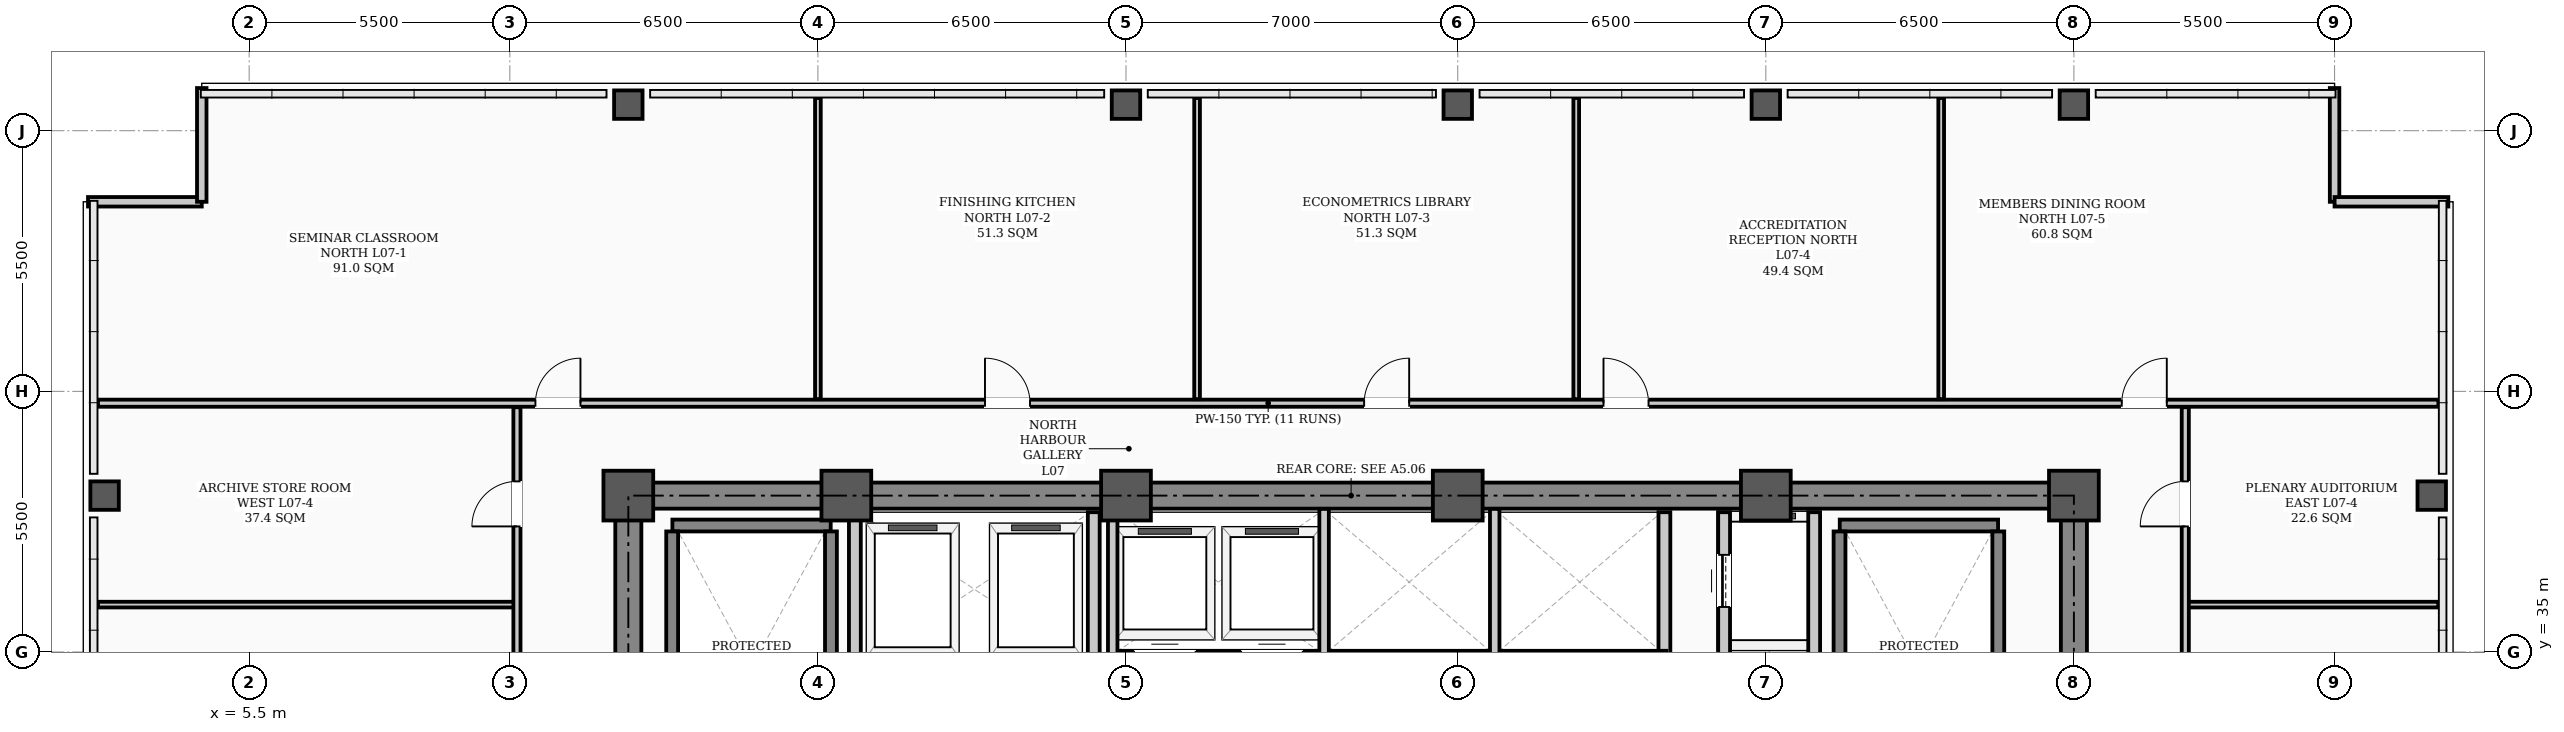
"""IFC4 building model, lengths in metres.
Left out: names, types, materials, properties, quantities, classifications, styles, units other than length and angle.
Written with IfcOpenShell. Run it as: python <this file> out.ifc"""

import sys

from ifc_helpers import new_model, si_unit, direction, frame, frame_2d, origin, origin_2d, place, context, subcontext, project, spatial, rectangle, hollow_rectangle, extrude, element, fill, save


model = new_model("IFC4")
c1 = context("Model", 3, precision=1e-05, world=origin(), true_north=direction((0.0, 1.0)))
c2 = subcontext(c1, "Body", "Model", "MODEL_VIEW")
j1 = project(units=[si_unit("LENGTHUNIT", "METRE"), si_unit("PLANEANGLEUNIT", "RADIAN")], contexts=[c1])
p1 = place(None, origin())
s1 = spatial("IfcSite", under=j1, at=p1, CompositionType="ELEMENT")
p2 = place(p1, origin())
s2 = spatial("IfcBuilding", under=s1, at=p2, CompositionType="ELEMENT")
p3 = place(p2, frame((0.0, 0.0, 30.4)))
s3 = spatial("IfcBuildingStorey", under=s2, at=p3, CompositionType="ELEMENT", Elevation=30.4)
for number, where, z_axis, x_axis in (
    (1, (13.5, 38.3, 0.0), (0.0, 0.0, 1.0), (1.0, 0.0, 0.0)),
    (2, (18.1, 38.3, 0.0), (0.0, 0.0, 1.0), (1.0, 0.0, 0.0)),
    (3, (24.0, 38.3, 0.0), (0.0, 0.0, 1.0), (1.0, 0.0, 0.0)),
    (4, (31.0, 38.3, 0.0), (0.0, 0.0, 1.0), (1.0, 0.0, 0.0)),
    (5, (37.5, 38.3, 0.0), (0.0, 0.0, 1.0), (1.0, 0.0, 0.0)),
    (6, (44.0, 38.3, 0.0), (0.0, 0.0, 1.0), (1.0, 0.0, 0.0)),
):
    element("IfcColumn", number, at=place(p3, frame(where, z_axis=z_axis, x_axis=x_axis)), inside=s3, PredefinedType="COLUMN", context=c2, shape_type="SweptSolid", body=[
        extrude(hollow_rectangle(XDim=1.05, YDim=1.05, WallThickness=0.038, InnerFilletRadius=0.019, OuterFilletRadius=0.057, at=origin_2d()), origin(), (0.0, 0.0, 1.0), 3.9),
    ])
for number, where, z_axis, x_axis in (
    (7, (2.45, 38.3, 0.0), (0.0, 0.0, 1.0), (1.0, 0.0, 0.0)),
    (8, (13.5, 46.55, 0.0), (0.0, 0.0, 1.0), (1.0, 0.0, 0.0)),
    (9, (24.0, 46.55, 0.0), (0.0, 0.0, 1.0), (1.0, 0.0, 0.0)),
    (10, (31.0, 46.55, 0.0), (0.0, 0.0, 1.0), (1.0, 0.0, 0.0)),
    (11, (37.5, 46.55, 0.0), (0.0, 0.0, 1.0), (1.0, 0.0, 0.0)),
    (12, (44.0, 46.55, 0.0), (0.0, 0.0, 1.0), (1.0, 0.0, 0.0)),
    (13, (51.55, 38.3, 0.0), (0.0, 0.0, 1.0), (1.0, 0.0, 0.0)),
):
    element("IfcColumn", number, at=place(p3, frame(where, z_axis=z_axis, x_axis=x_axis)), inside=s3, PredefinedType="COLUMN", context=c2, shape_type="SweptSolid", body=[
        extrude(hollow_rectangle(XDim=0.6, YDim=0.6, WallThickness=0.026, InnerFilletRadius=0.013, OuterFilletRadius=0.039, at=origin_2d()), origin(), (0.0, 0.0, 1.0), 3.9),
    ])
for number, where, z_axis, x_axis in (
    (14, (2.1, 44.5, 0.0), (0.0, 0.0, 1.0), (1.0, 0.0, 0.0)),
    (15, (4.5, 44.5, 0.0), (0.0, 0.0, 1.0), (0.0, 1.0, 0.0)),
    (16, (49.5, 46.9, 0.0), (0.0, 0.0, 1.0), (0.0, -1.0, 0.0)),
    (17, (49.5, 44.5, 0.0), (0.0, 0.0, 1.0), (1.0, 0.0, 0.0)),
):
    element("IfcWall", number, at=place(p3, frame(where, z_axis=z_axis, x_axis=x_axis)), inside=s3, PredefinedType="PARAPET", context=c2, shape_type="SweptSolid", body=[
        extrude(rectangle(XDim=2.4, YDim=0.2, at=frame_2d((1.2, 0.0))), origin(), (0.0, 0.0, 1.0), 1.2),
    ])
p4 = place(p3, frame((13.5, 38.3, 0.0), z_axis=(0.0, 0.0, 1.0), x_axis=(1.0, 0.0, 0.0)))
e18 = element("IfcWall", 18, at=p4, inside=s3, PredefinedType="SHEAR", context=c2, shape_type="SweptSolid", body=[
    extrude(rectangle(XDim=30.5, YDim=0.55, at=frame_2d((15.25, 0.0))), origin(), (0.0, 0.0, 1.0), 3.72),
])
for number, where, z_axis, x_axis in (
    (19, (13.5, 29.35, 0.0), (0.0, 0.0, 1.0), (0.0, 1.0, 0.0)),
    (20, (44.0, 29.35, 0.0), (0.0, 0.0, 1.0), (0.0, 1.0, 0.0)),
):
    element("IfcWall", number, at=place(p3, frame(where, z_axis=z_axis, x_axis=x_axis)), inside=s3, PredefinedType="SHEAR", context=c2, shape_type="SweptSolid", body=[
        extrude(rectangle(XDim=8.6, YDim=0.55, at=frame_2d((4.3, 0.0))), origin(), (0.0, 0.0, 1.0), 3.72),
    ])
p5 = place(p3, frame((14.43, 37.669, 0.0), z_axis=(0.0, 0.0, 1.0), x_axis=(1.0, 0.0, 0.0)))
e21 = element("IfcWall", 21, at=p5, inside=s3, PredefinedType="STANDARD", context=c2, shape_type="SweptSolid", body=[
    extrude(rectangle(XDim=3.34, YDim=0.25, at=frame_2d((1.67, 0.0))), origin(), (0.0, 0.0, 1.0), 3.72),
])
for number, where, z_axis, x_axis in (
    (22, (14.425, 30.36, 0.0), (0.0, 0.0, 1.0), (0.0, 1.0, 0.0)),
    (23, (17.775, 30.36, 0.0), (0.0, 0.0, 1.0), (0.0, 1.0, 0.0)),
):
    element("IfcWall", number, at=place(p3, frame(where, z_axis=z_axis, x_axis=x_axis)), inside=s3, PredefinedType="STANDARD", context=c2, shape_type="SweptSolid", body=[
        extrude(rectangle(XDim=7.184, YDim=0.25, at=frame_2d((3.592, 0.0))), origin(), (0.0, 0.0, 1.0), 3.72),
    ])
p6 = place(p3, frame((39.06, 37.669, 0.0), z_axis=(0.0, 0.0, 1.0), x_axis=(1.0, 0.0, 0.0)))
e24 = element("IfcWall", 24, at=p6, inside=s3, PredefinedType="STANDARD", context=c2, shape_type="SweptSolid", body=[
    extrude(rectangle(XDim=3.34, YDim=0.25, at=frame_2d((1.67, 0.0))), origin(), (0.0, 0.0, 1.0), 3.72),
])
for number, where, z_axis, x_axis in (
    (25, (39.055, 30.36, 0.0), (0.0, 0.0, 1.0), (0.0, 1.0, 0.0)),
    (26, (42.405, 30.36, 0.0), (0.0, 0.0, 1.0), (0.0, 1.0, 0.0)),
):
    element("IfcWall", number, at=place(p3, frame(where, z_axis=z_axis, x_axis=x_axis)), inside=s3, PredefinedType="STANDARD", context=c2, shape_type="SweptSolid", body=[
        extrude(rectangle(XDim=7.184, YDim=0.25, at=frame_2d((3.592, 0.0))), origin(), (0.0, 0.0, 1.0), 3.72),
    ])
p7 = place(p3, frame((36.62, 31.95, 0.0), z_axis=(0.0, 0.0, 1.0), x_axis=(0.0, 1.0, 0.0)))
e27 = element("IfcWall", 27, at=p7, inside=s3, PredefinedType="STANDARD", context=c2, shape_type="SweptSolid", body=[
    extrude(rectangle(XDim=6.0, YDim=0.25, at=frame_2d((3.0, 0.0))), origin(), (0.0, 0.0, 1.0), 3.3),
])
p8 = place(p7, frame((0.9, 0.0, 0.0)))
e28 = element("IfcOpeningElement", 28, at=p8, cuts=e27, PredefinedType="OPENING", context=c2, shape_type="SweptSolid", body=[
    extrude(rectangle(XDim=1.1, YDim=2.08, at=frame_2d((0.55, 1.04))), frame((0.0, 0.135, 0.0), z_axis=(0.0, -1.0, 0.0), x_axis=(1.0, 0.0, 0.0)), (0.0, 0.0, 1.0), 0.27),
])
p9 = place(p7, frame((4.0, 0.0, 0.0)))
e29 = element("IfcOpeningElement", 29, at=p9, cuts=e27, PredefinedType="OPENING", context=c2, shape_type="SweptSolid", body=[
    extrude(rectangle(XDim=1.1, YDim=2.08, at=frame_2d((0.55, 1.04))), frame((0.0, 0.135, 0.0), z_axis=(0.0, -1.0, 0.0), x_axis=(1.0, 0.0, 0.0)), (0.0, 0.0, 1.0), 0.27),
])
p10 = place(p3, frame((38.52, 31.95, 0.0), z_axis=(0.0, 0.0, 1.0), x_axis=(0.0, 1.0, 0.0)))
e30 = element("IfcWall", 30, at=p10, inside=s3, PredefinedType="STANDARD", context=c2, shape_type="SweptSolid", body=[
    extrude(rectangle(XDim=6.0, YDim=0.25, at=frame_2d((3.0, 0.0))), origin(), (0.0, 0.0, 1.0), 3.3),
])
for number, where, z_axis, x_axis in (
    (31, (18.28, 34.62, 0.0), (0.0, 0.0, 1.0), (0.0, 1.0, 0.0)),
    (32, (23.32, 34.62, 0.0), (0.0, 0.0, 1.0), (0.0, 1.0, 0.0)),
):
    element("IfcWall", number, at=place(p3, frame(where, z_axis=z_axis, x_axis=x_axis)), inside=s3, PredefinedType="STANDARD", context=c2, shape_type="SweptSolid", body=[
        extrude(rectangle(XDim=3.33, YDim=0.25, at=frame_2d((1.665, 0.0))), origin(), (0.0, 0.0, 1.0), 3.3),
    ])
p11 = place(p3, frame((35.36, 34.9, 0.0), z_axis=(0.0, 0.0, 1.0), x_axis=(0.0, 1.0, 0.0)))
e33 = element("IfcWall", 33, at=p11, inside=s3, PredefinedType="STANDARD", context=c2, shape_type="SweptSolid", body=[
    extrude(rectangle(XDim=3.05, YDim=0.25, at=frame_2d((1.525, 0.0))), origin(), (0.0, 0.0, 1.0), 3.3),
])
p12 = place(p3, frame((23.75, 34.9, 0.0), z_axis=(0.0, 0.0, 1.0), x_axis=(1.0, 0.0, 0.0)))
e34 = element("IfcWall", 34, at=p12, inside=s3, PredefinedType="STANDARD", context=c2, shape_type="SweptSolid", body=[
    extrude(rectangle(XDim=4.4, YDim=0.25, at=frame_2d((2.2, 0.0))), origin(), (0.0, 0.0, 1.0), 3.72),
])
p13 = place(p12, frame((0.42, 0.0, 0.0)))
e35 = element("IfcOpeningElement", 35, at=p13, cuts=e34, PredefinedType="OPENING", context=c2, shape_type="SweptSolid", body=[
    extrude(rectangle(XDim=1.3, YDim=2.08, at=frame_2d((0.65, 1.04))), frame((0.0, 0.135, 0.0), z_axis=(0.0, -1.0, 0.0), x_axis=(1.0, 0.0, 0.0)), (0.0, 0.0, 1.0), 0.27),
])
p14 = place(p12, frame((2.68, 0.0, 0.0)))
e36 = element("IfcOpeningElement", 36, at=p14, cuts=e34, PredefinedType="OPENING", context=c2, shape_type="SweptSolid", body=[
    extrude(rectangle(XDim=1.3, YDim=2.08, at=frame_2d((0.65, 1.04))), frame((0.0, 0.135, 0.0), z_axis=(0.0, -1.0, 0.0), x_axis=(1.0, 0.0, 0.0)), (0.0, 0.0, 1.0), 0.27),
])
p15 = place(p3, frame((28.2, 34.9, 0.0), z_axis=(0.0, 0.0, 1.0), x_axis=(1.0, 0.0, 0.0)))
e37 = element("IfcWall", 37, at=p15, inside=s3, PredefinedType="STANDARD", context=c2, shape_type="SweptSolid", body=[
    extrude(rectangle(XDim=3.55, YDim=0.25, at=frame_2d((1.775, 0.0))), origin(), (0.0, 0.0, 1.0), 3.72),
])
p16 = place(p3, frame((31.8, 34.9, 0.0), z_axis=(0.0, 0.0, 1.0), x_axis=(1.0, 0.0, 0.0)))
e38 = element("IfcWall", 38, at=p16, inside=s3, PredefinedType="STANDARD", context=c2, shape_type="SweptSolid", body=[
    extrude(rectangle(XDim=3.6, YDim=0.25, at=frame_2d((1.8, 0.0))), origin(), (0.0, 0.0, 1.0), 3.72),
])
p17 = place(p3, frame((2.31, 36.0, 0.0), z_axis=(0.0, 0.0, 1.0), x_axis=(1.0, 0.0, 0.0)))
e39 = element("IfcWall", 39, at=p17, inside=s3, PredefinedType="PARTITIONING", context=c2, shape_type="SweptSolid", body=[
    extrude(rectangle(XDim=8.84, YDim=0.12, at=frame_2d((4.42, 0.0))), origin(), (0.0, 0.0, 1.0), 3.212),
])
p18 = place(p3, frame((46.35, 36.0, 0.0), z_axis=(0.0, 0.0, 1.0), x_axis=(1.0, 0.0, 0.0)))
e40 = element("IfcWall", 40, at=p18, inside=s3, PredefinedType="PARTITIONING", context=c2, shape_type="SweptSolid", body=[
    extrude(rectangle(XDim=5.34, YDim=0.12, at=frame_2d((2.67, 0.0))), origin(), (0.0, 0.0, 1.0), 3.212),
])
p19 = place(p3, frame((2.31, 40.25, 0.0), z_axis=(0.0, 0.0, 1.0), x_axis=(1.0, 0.0, 0.0)))
e41 = element("IfcWall", 41, at=p19, inside=s3, PredefinedType="PARTITIONING", context=c2, shape_type="SweptSolid", body=[
    extrude(rectangle(XDim=49.38, YDim=0.15, at=frame_2d((24.69, 0.0))), origin(), (0.0, 0.0, 1.0), 3.1),
])
p20 = place(p19, frame((9.23, 0.0, 0.0)))
e42 = element("IfcOpeningElement", 42, at=p20, cuts=e41, PredefinedType="OPENING", context=c2, shape_type="SweptSolid", body=[
    extrude(rectangle(XDim=0.95, YDim=2.08, at=frame_2d((0.475, 1.04))), frame((0.0, 0.085, 0.0), z_axis=(0.0, -1.0, 0.0), x_axis=(1.0, 0.0, 0.0)), (0.0, 0.0, 1.0), 0.17),
])
p21 = place(p19, frame((18.715, 0.0, 0.0)))
e43 = element("IfcOpeningElement", 43, at=p21, cuts=e41, PredefinedType="OPENING", context=c2, shape_type="SweptSolid", body=[
    extrude(rectangle(XDim=0.95, YDim=2.08, at=frame_2d((0.475, 1.04))), frame((0.0, 0.085, 0.0), z_axis=(0.0, -1.0, 0.0), x_axis=(1.0, 0.0, 0.0)), (0.0, 0.0, 1.0), 0.17),
])
p22 = place(p19, frame((26.715, 0.0, 0.0)))
e44 = element("IfcOpeningElement", 44, at=p22, cuts=e41, PredefinedType="OPENING", context=c2, shape_type="SweptSolid", body=[
    extrude(rectangle(XDim=0.95, YDim=2.08, at=frame_2d((0.475, 1.04))), frame((0.0, 0.085, 0.0), z_axis=(0.0, -1.0, 0.0), x_axis=(1.0, 0.0, 0.0)), (0.0, 0.0, 1.0), 0.17),
])
p23 = place(p19, frame((31.765, 0.0, 0.0)))
e45 = element("IfcOpeningElement", 45, at=p23, cuts=e41, PredefinedType="OPENING", context=c2, shape_type="SweptSolid", body=[
    extrude(rectangle(XDim=0.95, YDim=2.08, at=frame_2d((0.475, 1.04))), frame((0.0, 0.085, 0.0), z_axis=(0.0, -1.0, 0.0), x_axis=(1.0, 0.0, 0.0)), (0.0, 0.0, 1.0), 0.17),
])
p24 = place(p19, frame((42.7, 0.0, 0.0)))
e46 = element("IfcOpeningElement", 46, at=p24, cuts=e41, PredefinedType="OPENING", context=c2, shape_type="SweptSolid", body=[
    extrude(rectangle(XDim=0.95, YDim=2.08, at=frame_2d((0.475, 1.04))), frame((0.0, 0.085, 0.0), z_axis=(0.0, -1.0, 0.0), x_axis=(1.0, 0.0, 0.0)), (0.0, 0.0, 1.0), 0.17),
])
p25 = place(p3, frame((11.15, 17.635, 0.0), z_axis=(0.0, 0.0, 1.0), x_axis=(0.0, 1.0, 0.0)))
e47 = element("IfcWall", 47, at=p25, inside=s3, PredefinedType="PARTITIONING", context=c2, shape_type="SweptSolid", body=[
    extrude(rectangle(XDim=22.53, YDim=0.15, at=frame_2d((11.265, 0.0))), origin(), (0.0, 0.0, 1.0), 3.0),
])
p26 = place(p25, frame((3.165, 0.0, 0.0)))
e48 = element("IfcOpeningElement", 48, at=p26, cuts=e47, PredefinedType="OPENING", context=c2, shape_type="SweptSolid", body=[
    extrude(rectangle(XDim=0.95, YDim=2.08, at=frame_2d((0.475, 1.04))), frame((0.0, 0.085, 0.0), z_axis=(0.0, -1.0, 0.0), x_axis=(1.0, 0.0, 0.0)), (0.0, 0.0, 1.0), 0.17),
])
p27 = place(p25, frame((8.09, 0.0, 0.0)))
e49 = element("IfcOpeningElement", 49, at=p27, cuts=e47, PredefinedType="OPENING", context=c2, shape_type="SweptSolid", body=[
    extrude(rectangle(XDim=0.95, YDim=2.08, at=frame_2d((0.475, 1.04))), frame((0.0, 0.085, 0.0), z_axis=(0.0, -1.0, 0.0), x_axis=(1.0, 0.0, 0.0)), (0.0, 0.0, 1.0), 0.17),
])
p28 = place(p25, frame((15.39, 0.0, 0.0)))
e50 = element("IfcOpeningElement", 50, at=p28, cuts=e47, PredefinedType="OPENING", context=c2, shape_type="SweptSolid", body=[
    extrude(rectangle(XDim=0.95, YDim=2.08, at=frame_2d((0.475, 1.04))), frame((0.0, 0.085, 0.0), z_axis=(0.0, -1.0, 0.0), x_axis=(1.0, 0.0, 0.0)), (0.0, 0.0, 1.0), 0.17),
])
p29 = place(p25, frame((20.015, 0.0, 0.0)))
e51 = element("IfcOpeningElement", 51, at=p29, cuts=e47, PredefinedType="OPENING", context=c2, shape_type="SweptSolid", body=[
    extrude(rectangle(XDim=0.95, YDim=2.08, at=frame_2d((0.475, 1.04))), frame((0.0, 0.085, 0.0), z_axis=(0.0, -1.0, 0.0), x_axis=(1.0, 0.0, 0.0)), (0.0, 0.0, 1.0), 0.17),
])
p30 = place(p3, frame((46.35, 17.635, 0.0), z_axis=(0.0, 0.0, 1.0), x_axis=(0.0, 1.0, 0.0)))
e52 = element("IfcWall", 52, at=p30, inside=s3, PredefinedType="PARTITIONING", context=c2, shape_type="SweptSolid", body=[
    extrude(rectangle(XDim=22.53, YDim=0.15, at=frame_2d((11.265, 0.0))), origin(), (0.0, 0.0, 1.0), 3.0),
])
p31 = place(p30, frame((3.165, 0.0, 0.0)))
e53 = element("IfcOpeningElement", 53, at=p31, cuts=e52, PredefinedType="OPENING", context=c2, shape_type="SweptSolid", body=[
    extrude(rectangle(XDim=0.95, YDim=2.08, at=frame_2d((0.475, 1.04))), frame((0.0, 0.085, 0.0), z_axis=(0.0, -1.0, 0.0), x_axis=(1.0, 0.0, 0.0)), (0.0, 0.0, 1.0), 0.17),
])
p32 = place(p30, frame((8.09, 0.0, 0.0)))
e54 = element("IfcOpeningElement", 54, at=p32, cuts=e52, PredefinedType="OPENING", context=c2, shape_type="SweptSolid", body=[
    extrude(rectangle(XDim=0.95, YDim=2.08, at=frame_2d((0.475, 1.04))), frame((0.0, 0.085, 0.0), z_axis=(0.0, -1.0, 0.0), x_axis=(1.0, 0.0, 0.0)), (0.0, 0.0, 1.0), 0.17),
])
p33 = place(p30, frame((15.39, 0.0, 0.0)))
e55 = element("IfcOpeningElement", 55, at=p33, cuts=e52, PredefinedType="OPENING", context=c2, shape_type="SweptSolid", body=[
    extrude(rectangle(XDim=0.95, YDim=2.08, at=frame_2d((0.475, 1.04))), frame((0.0, 0.085, 0.0), z_axis=(0.0, -1.0, 0.0), x_axis=(1.0, 0.0, 0.0)), (0.0, 0.0, 1.0), 0.17),
])
p34 = place(p30, frame((20.015, 0.0, 0.0)))
e56 = element("IfcOpeningElement", 56, at=p34, cuts=e52, PredefinedType="OPENING", context=c2, shape_type="SweptSolid", body=[
    extrude(rectangle(XDim=0.95, YDim=2.08, at=frame_2d((0.475, 1.04))), frame((0.0, 0.085, 0.0), z_axis=(0.0, -1.0, 0.0), x_axis=(1.0, 0.0, 0.0)), (0.0, 0.0, 1.0), 0.17),
])
for number, where, z_axis, x_axis in (
    (57, (17.5, 40.335, 0.0), (0.0, 0.0, 1.0), (0.0, 1.0, 0.0)),
    (58, (25.5, 40.335, 0.0), (0.0, 0.0, 1.0), (0.0, 1.0, 0.0)),
    (59, (33.5, 40.335, 0.0), (0.0, 0.0, 1.0), (0.0, 1.0, 0.0)),
    (60, (41.2, 40.335, 0.0), (0.0, 0.0, 1.0), (0.0, 1.0, 0.0)),
):
    element("IfcWall", number, at=place(p3, frame(where, z_axis=z_axis, x_axis=x_axis)), inside=s3, PredefinedType="PARTITIONING", context=c2, shape_type="SweptSolid", body=[
        extrude(rectangle(XDim=6.355, YDim=0.12, at=frame_2d((3.177, 0.0))), origin(), (0.0, 0.0, 1.0), 3.212),
    ])
p35 = place(p3, frame((23.72, 34.9, 0.0), z_axis=(0.0, 0.0, 1.0), x_axis=(0.0, 1.0, 0.0)))
e61 = element("IfcWall", 61, at=p35, inside=s3, PredefinedType="STANDARD", context=c2, shape_type="SweptSolid", body=[
    extrude(rectangle(XDim=3.12, YDim=0.2, at=frame_2d((1.56, 0.0))), origin(), (0.0, 0.0, 1.0), 3.1),
])
for number, where, z_axis, x_axis in (
    (62, (28.18, 34.9, 0.0), (0.0, 0.0, 1.0), (0.0, 1.0, 0.0)),
    (63, (31.78, 34.9, 0.0), (0.0, 0.0, 1.0), (0.0, 1.0, 0.0)),
):
    element("IfcWall", number, at=place(p3, frame(where, z_axis=z_axis, x_axis=x_axis)), inside=s3, PredefinedType="STANDARD", context=c2, shape_type="SweptSolid", body=[
        extrude(rectangle(XDim=3.12, YDim=0.2, at=frame_2d((1.56, 0.0))), origin(), (0.0, 0.0, 1.0), 3.3),
    ])
p36 = place(p29, origin())
e64 = element("IfcDoor", 64, at=p36, inside=s3, OperationType="SINGLE_SWING_LEFT", PredefinedType="DOOR", context=c2, shape_type="SweptSolid", body=[
    extrude(rectangle(XDim=0.95, YDim=2.08, at=frame_2d((0.475, 1.04))), frame((0.0, 0.025, 0.0), z_axis=(0.0, -1.0, 0.0), x_axis=(1.0, 0.0, 0.0)), (0.0, 0.0, 1.0), 0.05),
])
fill(e51, e64)
p37 = place(p34, origin())
e65 = element("IfcDoor", 65, at=p37, inside=s3, OperationType="SINGLE_SWING_LEFT", PredefinedType="DOOR", context=c2, shape_type="SweptSolid", body=[
    extrude(rectangle(XDim=0.95, YDim=2.08, at=frame_2d((0.475, 1.04))), frame((0.0, 0.025, 0.0), z_axis=(0.0, -1.0, 0.0), x_axis=(1.0, 0.0, 0.0)), (0.0, 0.0, 1.0), 0.05),
])
fill(e56, e65)
p38 = place(p20, origin())
e66 = element("IfcDoor", 66, at=p38, inside=s3, OperationType="SINGLE_SWING_RIGHT", PredefinedType="DOOR", context=c2, shape_type="SweptSolid", body=[
    extrude(rectangle(XDim=0.95, YDim=2.08, at=frame_2d((0.475, 1.04))), frame((0.0, 0.025, 0.0), z_axis=(0.0, -1.0, 0.0), x_axis=(1.0, 0.0, 0.0)), (0.0, 0.0, 1.0), 0.05),
])
fill(e42, e66)
p39 = place(p21, origin())
e67 = element("IfcDoor", 67, at=p39, inside=s3, OperationType="SINGLE_SWING_LEFT", PredefinedType="DOOR", context=c2, shape_type="SweptSolid", body=[
    extrude(rectangle(XDim=0.95, YDim=2.08, at=frame_2d((0.475, 1.04))), frame((0.0, 0.025, 0.0), z_axis=(0.0, -1.0, 0.0), x_axis=(1.0, 0.0, 0.0)), (0.0, 0.0, 1.0), 0.05),
])
fill(e43, e67)
p40 = place(p22, origin())
e68 = element("IfcDoor", 68, at=p40, inside=s3, OperationType="SINGLE_SWING_RIGHT", PredefinedType="DOOR", context=c2, shape_type="SweptSolid", body=[
    extrude(rectangle(XDim=0.95, YDim=2.08, at=frame_2d((0.475, 1.04))), frame((0.0, 0.025, 0.0), z_axis=(0.0, -1.0, 0.0), x_axis=(1.0, 0.0, 0.0)), (0.0, 0.0, 1.0), 0.05),
])
fill(e44, e68)
p41 = place(p23, origin())
e69 = element("IfcDoor", 69, at=p41, inside=s3, OperationType="SINGLE_SWING_LEFT", PredefinedType="DOOR", context=c2, shape_type="SweptSolid", body=[
    extrude(rectangle(XDim=0.95, YDim=2.08, at=frame_2d((0.475, 1.04))), frame((0.0, 0.025, 0.0), z_axis=(0.0, -1.0, 0.0), x_axis=(1.0, 0.0, 0.0)), (0.0, 0.0, 1.0), 0.05),
])
fill(e45, e69)
p42 = place(p24, origin())
e70 = element("IfcDoor", 70, at=p42, inside=s3, OperationType="SINGLE_SWING_RIGHT", PredefinedType="DOOR", context=c2, shape_type="SweptSolid", body=[
    extrude(rectangle(XDim=0.95, YDim=2.08, at=frame_2d((0.475, 1.04))), frame((0.0, 0.025, 0.0), z_axis=(0.0, -1.0, 0.0), x_axis=(1.0, 0.0, 0.0)), (0.0, 0.0, 1.0), 0.05),
])
fill(e46, e70)
p43 = place(p9, origin())
e71 = element("IfcDoor", 71, at=p43, inside=s3, OperationType="SLIDING_TO_LEFT", PredefinedType="DOOR", context=c2, shape_type="SweptSolid", body=[
    extrude(rectangle(XDim=1.1, YDim=2.08, at=frame_2d((0.55, 1.04))), frame((0.0, 0.025, 0.0), z_axis=(0.0, -1.0, 0.0), x_axis=(1.0, 0.0, 0.0)), (0.0, 0.0, 1.0), 0.05),
])
fill(e29, e71)
save(model, sys.argv[1])
